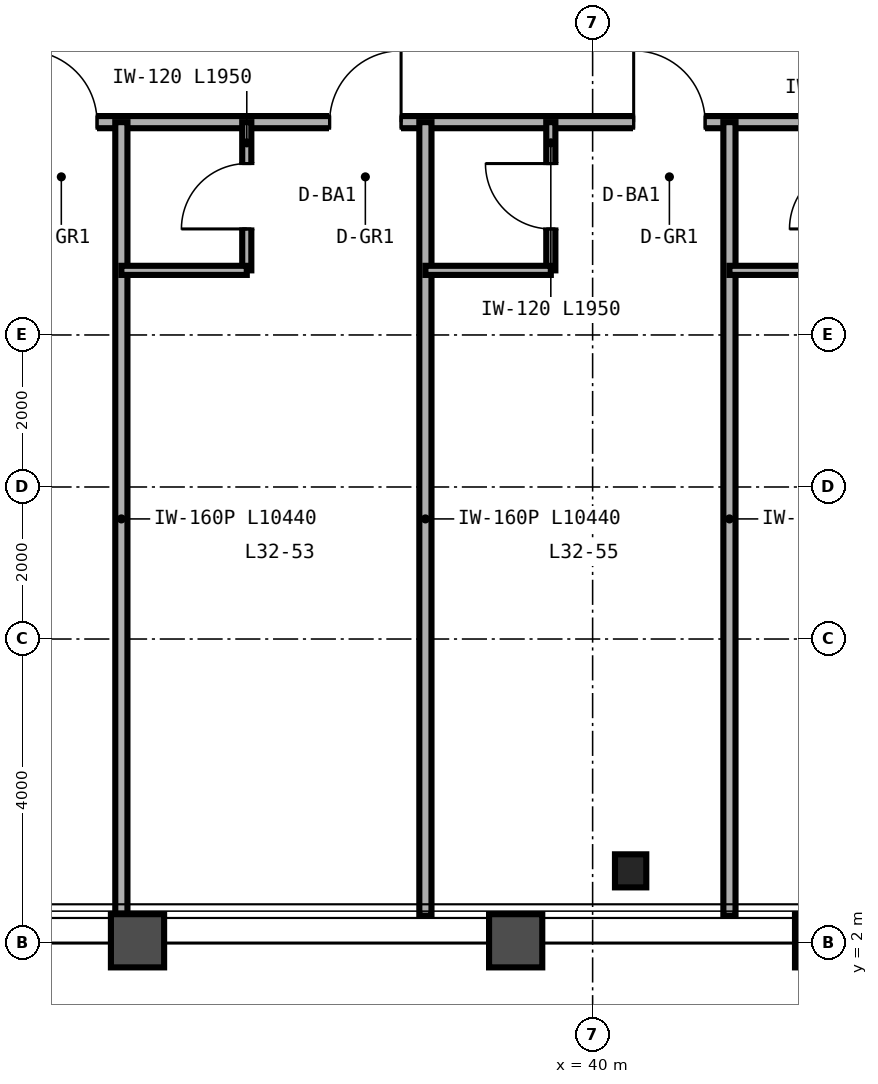
"""IFC4 building model, lengths in metres.
Left out: names, types, materials, properties, quantities, classifications, styles, units other than length and angle.
Written with IfcOpenShell. Run it as: python <this file> out.ifc"""

import sys

from ifc_helpers import new_model, si_unit, direction, frame, frame_2d, origin, origin_2d, place, context, subcontext, project, spatial, rectangle, i_section, extrude, source, transform, mapped, element, fill, save


model = new_model("IFC4")
c1 = context("Model", 3, precision=1e-05, world=origin(), true_north=direction((0.0, 1.0)))
c2 = subcontext(c1, "Body", "Model", "MODEL_VIEW")
j1 = project(units=[si_unit("LENGTHUNIT", "METRE"), si_unit("PLANEANGLEUNIT", "RADIAN")], contexts=[c1])
p1 = place(None, origin())
s1 = spatial("IfcSite", under=j1, at=p1, CompositionType="ELEMENT")
p2 = place(p1, origin())
s2 = spatial("IfcBuilding", under=s1, at=p2, CompositionType="ELEMENT")
p3 = place(p2, frame((0.0, 0.0, 129.6)))
s3 = spatial("IfcBuildingStorey", under=s2, at=p3, CompositionType="ELEMENT", Elevation=129.6)
m1 = source(origin(), c2, "Body", "SweptSolid", [
    extrude(i_section(OverallWidth=0.412, OverallDepth=0.435, WebThickness=0.036, FlangeThickness=0.057, FilletRadius=0.025, at=origin_2d()), origin(), (0.0, 0.0, 1.0), 3.36),
])
p4 = place(p3, frame((40.5, 2.95, 0.0), z_axis=(0.0, 0.0, 1.0), x_axis=(1.0, 0.0, 0.0)))
e1 = element("IfcColumn", 1, at=p4, inside=s3, PredefinedType="COLUMN", context=c2, shape_type="MappedRepresentation", body=[
    mapped(m1, transform((0.0, 0.0, 0.0), scale=1.0)),
])
p5 = place(p3, frame((14.0, 12.8, 0.0), z_axis=(0.0, 0.0, 1.0), x_axis=(1.0, 0.0, 0.0)))
e2 = element("IfcWall", 2, at=p5, inside=s3, PredefinedType="PARTITIONING", context=c2, shape_type="SweptSolid", body=[
    extrude(rectangle(XDim=36.0, YDim=0.16, at=frame_2d((18.0, 0.0))), origin(), (0.0, 0.0, 1.0), 2.581),
])
p6 = place(p5, frame((2.64, 0.0, 0.0)))
e3 = element("IfcOpeningElement", 3, at=p6, cuts=e2, PredefinedType="OPENING", context=c2, shape_type="SweptSolid", body=[
    extrude(rectangle(XDim=0.94, YDim=2.15, at=frame_2d((0.47, 1.075))), frame((0.0, 0.09, 0.0), z_axis=(0.0, -1.0, 0.0), x_axis=(1.0, 0.0, 0.0)), (0.0, 0.0, 1.0), 0.18),
])
p7 = place(p5, frame((6.54, 0.0, 0.0)))
e4 = element("IfcOpeningElement", 4, at=p7, cuts=e2, PredefinedType="OPENING", context=c2, shape_type="SweptSolid", body=[
    extrude(rectangle(XDim=0.94, YDim=2.15, at=frame_2d((0.47, 1.075))), frame((0.0, 0.09, 0.0), z_axis=(0.0, -1.0, 0.0), x_axis=(1.0, 0.0, 0.0)), (0.0, 0.0, 1.0), 0.18),
])
p8 = place(p5, frame((10.54, 0.0, 0.0)))
e5 = element("IfcOpeningElement", 5, at=p8, cuts=e2, PredefinedType="OPENING", context=c2, shape_type="SweptSolid", body=[
    extrude(rectangle(XDim=0.94, YDim=2.15, at=frame_2d((0.47, 1.075))), frame((0.0, 0.09, 0.0), z_axis=(0.0, -1.0, 0.0), x_axis=(1.0, 0.0, 0.0)), (0.0, 0.0, 1.0), 0.18),
])
p9 = place(p5, frame((14.54, 0.0, 0.0)))
e6 = element("IfcOpeningElement", 6, at=p9, cuts=e2, PredefinedType="OPENING", context=c2, shape_type="SweptSolid", body=[
    extrude(rectangle(XDim=0.94, YDim=2.15, at=frame_2d((0.47, 1.075))), frame((0.0, 0.09, 0.0), z_axis=(0.0, -1.0, 0.0), x_axis=(1.0, 0.0, 0.0)), (0.0, 0.0, 1.0), 0.18),
])
p10 = place(p5, frame((18.54, 0.0, 0.0)))
e7 = element("IfcOpeningElement", 7, at=p10, cuts=e2, PredefinedType="OPENING", context=c2, shape_type="SweptSolid", body=[
    extrude(rectangle(XDim=0.94, YDim=2.15, at=frame_2d((0.47, 1.075))), frame((0.0, 0.09, 0.0), z_axis=(0.0, -1.0, 0.0), x_axis=(1.0, 0.0, 0.0)), (0.0, 0.0, 1.0), 0.18),
])
p11 = place(p5, frame((22.54, 0.0, 0.0)))
e8 = element("IfcOpeningElement", 8, at=p11, cuts=e2, PredefinedType="OPENING", context=c2, shape_type="SweptSolid", body=[
    extrude(rectangle(XDim=0.94, YDim=2.15, at=frame_2d((0.47, 1.075))), frame((0.0, 0.09, 0.0), z_axis=(0.0, -1.0, 0.0), x_axis=(1.0, 0.0, 0.0)), (0.0, 0.0, 1.0), 0.18),
])
p12 = place(p5, frame((26.54, 0.0, 0.0)))
e9 = element("IfcOpeningElement", 9, at=p12, cuts=e2, PredefinedType="OPENING", context=c2, shape_type="SweptSolid", body=[
    extrude(rectangle(XDim=0.94, YDim=2.15, at=frame_2d((0.47, 1.075))), frame((0.0, 0.09, 0.0), z_axis=(0.0, -1.0, 0.0), x_axis=(1.0, 0.0, 0.0)), (0.0, 0.0, 1.0), 0.18),
])
p13 = place(p5, frame((30.64, 0.0, 0.0)))
e10 = element("IfcOpeningElement", 10, at=p13, cuts=e2, PredefinedType="OPENING", context=c2, shape_type="SweptSolid", body=[
    extrude(rectangle(XDim=0.94, YDim=2.15, at=frame_2d((0.47, 1.075))), frame((0.0, 0.09, 0.0), z_axis=(0.0, -1.0, 0.0), x_axis=(1.0, 0.0, 0.0)), (0.0, 0.0, 1.0), 0.18),
])
p14 = place(p5, frame((34.74, 0.0, 0.0)))
e11 = element("IfcOpeningElement", 11, at=p14, cuts=e2, PredefinedType="OPENING", context=c2, shape_type="SweptSolid", body=[
    extrude(rectangle(XDim=0.94, YDim=2.15, at=frame_2d((0.47, 1.075))), frame((0.0, 0.09, 0.0), z_axis=(0.0, -1.0, 0.0), x_axis=(1.0, 0.0, 0.0)), (0.0, 0.0, 1.0), 0.18),
])
for number, where, z_axis, x_axis in (
    (12, (33.8, 2.36, 0.0), (0.0, 0.0, 1.0), (0.0, 1.0, 0.0)),
    (13, (37.8, 2.36, 0.0), (0.0, 0.0, 1.0), (0.0, 1.0, 0.0)),
):
    element("IfcWall", number, at=place(p3, frame(where, z_axis=z_axis, x_axis=x_axis)), inside=s3, PredefinedType="PARTITIONING", context=c2, shape_type="SweptSolid", body=[
        extrude(rectangle(XDim=10.44, YDim=0.16, at=frame_2d((5.22, 0.0))), origin(), (0.0, 0.0, 1.0), 2.433),
    ])
p15 = place(p3, frame((35.45, 10.85, 0.0), z_axis=(0.0, 0.0, 1.0), x_axis=(0.0, 1.0, 0.0)))
e14 = element("IfcWall", 14, at=p15, inside=s3, PredefinedType="PARTITIONING", context=c2, shape_type="SweptSolid", body=[
    extrude(rectangle(XDim=1.95, YDim=0.12, at=frame_2d((0.975, 0.0))), origin(), (0.0, 0.0, 1.0), 3.36),
])
p16 = place(p15, frame((0.545, 0.0, 0.0)))
e15 = element("IfcOpeningElement", 15, at=p16, cuts=e14, PredefinedType="OPENING", context=c2, shape_type="SweptSolid", body=[
    extrude(rectangle(XDim=0.86, YDim=2.1, at=frame_2d((0.43, 1.05))), frame((0.0, 0.07, 0.0), z_axis=(0.0, -1.0, 0.0), x_axis=(1.0, 0.0, 0.0)), (0.0, 0.0, 1.0), 0.14),
])
p17 = place(p3, frame((33.8, 10.85, 0.0), z_axis=(0.0, 0.0, 1.0), x_axis=(1.0, 0.0, 0.0)))
e16 = element("IfcWall", 16, at=p17, inside=s3, PredefinedType="PARTITIONING", context=c2, shape_type="SweptSolid", body=[
    extrude(rectangle(XDim=1.65, YDim=0.12, at=frame_2d((0.825, 0.0))), origin(), (0.0, 0.0, 1.0), 3.36),
])
p18 = place(p3, frame((41.8, 2.36, 0.0), z_axis=(0.0, 0.0, 1.0), x_axis=(0.0, 1.0, 0.0)))
e17 = element("IfcWall", 17, at=p18, inside=s3, PredefinedType="PARTITIONING", context=c2, shape_type="SweptSolid", body=[
    extrude(rectangle(XDim=10.44, YDim=0.16, at=frame_2d((5.22, 0.0))), origin(), (0.0, 0.0, 1.0), 2.823),
])
p19 = place(p3, frame((39.45, 10.85, 0.0), z_axis=(0.0, 0.0, 1.0), x_axis=(0.0, 1.0, 0.0)))
e18 = element("IfcWall", 18, at=p19, inside=s3, PredefinedType="PARTITIONING", context=c2, shape_type="SweptSolid", body=[
    extrude(rectangle(XDim=1.95, YDim=0.12, at=frame_2d((0.975, 0.0))), origin(), (0.0, 0.0, 1.0), 3.36),
])
p20 = place(p19, frame((0.545, 0.0, 0.0)))
e19 = element("IfcOpeningElement", 19, at=p20, cuts=e18, PredefinedType="OPENING", context=c2, shape_type="SweptSolid", body=[
    extrude(rectangle(XDim=0.86, YDim=2.1, at=frame_2d((0.43, 1.05))), frame((0.0, 0.07, 0.0), z_axis=(0.0, -1.0, 0.0), x_axis=(1.0, 0.0, 0.0)), (0.0, 0.0, 1.0), 0.14),
])
for number, where, z_axis, x_axis in (
    (20, (37.8, 10.85, 0.0), (0.0, 0.0, 1.0), (1.0, 0.0, 0.0)),
    (21, (41.8, 10.85, 0.0), (0.0, 0.0, 1.0), (1.0, 0.0, 0.0)),
):
    element("IfcWall", number, at=place(p3, frame(where, z_axis=z_axis, x_axis=x_axis)), inside=s3, PredefinedType="PARTITIONING", context=c2, shape_type="SweptSolid", body=[
        extrude(rectangle(XDim=1.65, YDim=0.12, at=frame_2d((0.825, 0.0))), origin(), (0.0, 0.0, 1.0), 3.36),
    ])
m2 = source(origin(), c2, "Body", "SweptSolid", [
    extrude(rectangle(XDim=0.86, YDim=2.1, at=frame_2d((0.43, 1.05))), frame((0.0, 0.025, 0.0), z_axis=(0.0, -1.0, 0.0), x_axis=(1.0, 0.0, 0.0)), (0.0, 0.0, 1.0), 0.05),
])
p21 = place(p16, origin())
e22 = element("IfcDoor", 22, at=p21, inside=s3, OperationType="SINGLE_SWING_LEFT", PredefinedType="DOOR", context=c2, shape_type="MappedRepresentation", body=[
    mapped(m2, transform((0.0, 0.0, 0.0), scale=1.0)),
])
fill(e15, e22)
p22 = place(p20, origin())
e23 = element("IfcDoor", 23, at=p22, inside=s3, OperationType="SINGLE_SWING_RIGHT", PredefinedType="DOOR", context=c2, shape_type="MappedRepresentation", body=[
    mapped(m2, transform((0.0, 0.0, 0.0), scale=1.0)),
])
fill(e19, e23)
m3 = source(origin(), c2, "Body", "SweptSolid", [
    extrude(rectangle(XDim=0.94, YDim=2.15, at=frame_2d((0.47, 1.075))), frame((0.0, 0.025, 0.0), z_axis=(0.0, -1.0, 0.0), x_axis=(1.0, 0.0, 0.0)), (0.0, 0.0, 1.0), 0.05),
])
p23 = place(p10, origin())
e24 = element("IfcDoor", 24, at=p23, inside=s3, OperationType="SINGLE_SWING_LEFT", PredefinedType="DOOR", context=c2, shape_type="MappedRepresentation", body=[
    mapped(m3, transform((0.0, 0.0, 0.0), scale=1.0)),
])
fill(e7, e24)
p24 = place(p11, origin())
e25 = element("IfcDoor", 25, at=p24, inside=s3, OperationType="SINGLE_SWING_RIGHT", PredefinedType="DOOR", context=c2, shape_type="MappedRepresentation", body=[
    mapped(m3, transform((0.0, 0.0, 0.0), scale=1.0)),
])
fill(e8, e25)
p25 = place(p12, origin())
e26 = element("IfcDoor", 26, at=p25, inside=s3, OperationType="SINGLE_SWING_LEFT", PredefinedType="DOOR", context=c2, shape_type="MappedRepresentation", body=[
    mapped(m3, transform((0.0, 0.0, 0.0), scale=1.0)),
])
fill(e9, e26)
save(model, sys.argv[1])
